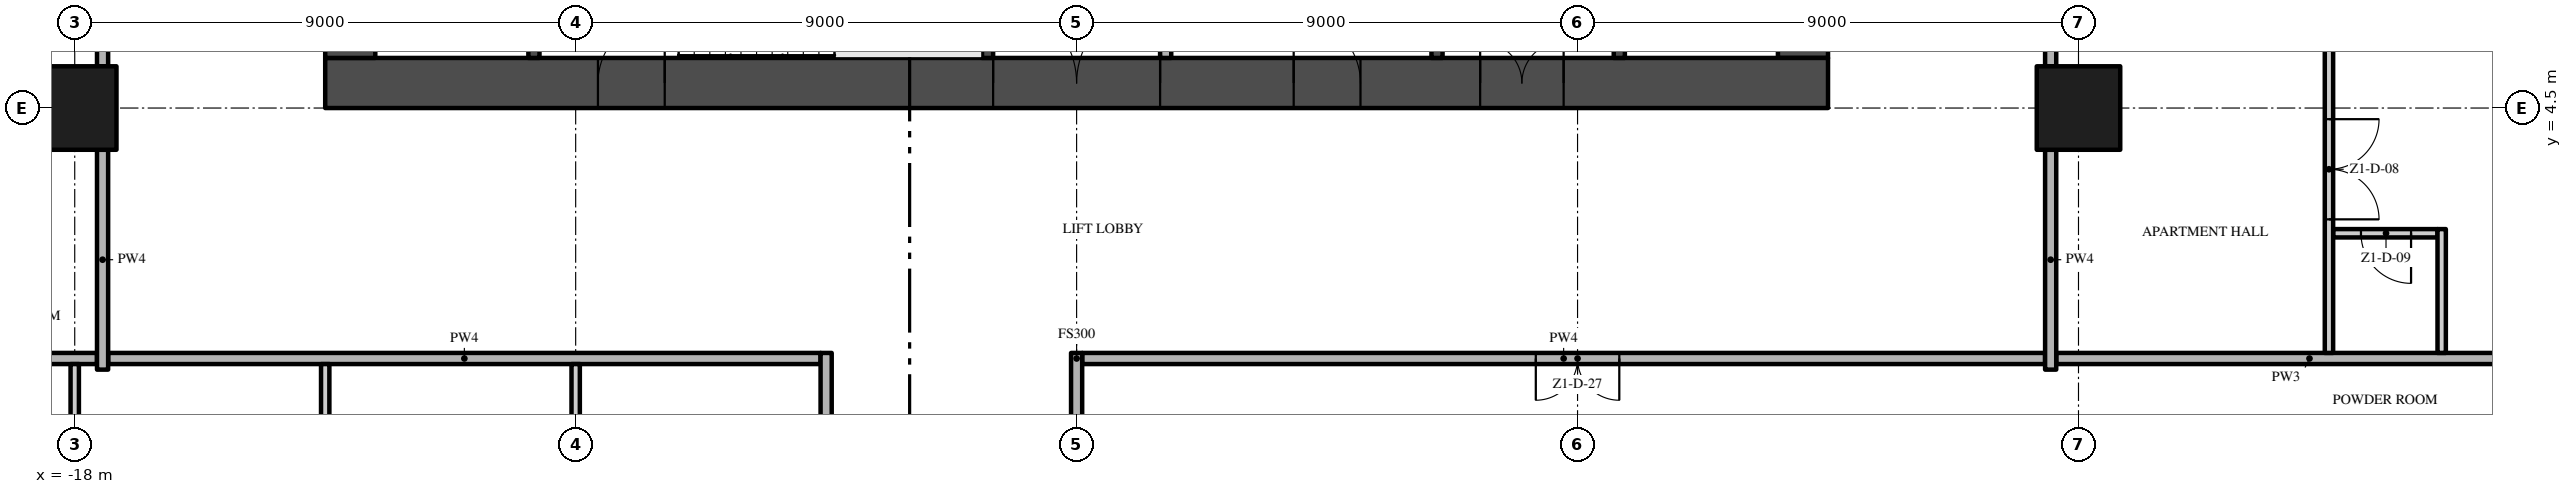
"""IFC4 building model, lengths in metres.
Left out: names, types, materials, properties, quantities, classifications, styles, units other than length and angle.
Written with IfcOpenShell. Run it as: python <this file> out.ifc"""

import sys

from ifc_helpers import new_model, si_unit, direction, frame, frame_2d, origin, origin_2d, place, context, subcontext, project, spatial, rectangle, extrude, element, fill, save


model = new_model("IFC4")
c1 = context("Model", 3, precision=1e-05, world=origin(), true_north=direction((0.0, 1.0)))
c2 = subcontext(c1, "Body", "Model", "MODEL_VIEW")
j1 = project(units=[si_unit("LENGTHUNIT", "METRE"), si_unit("PLANEANGLEUNIT", "RADIAN")], contexts=[c1])
p1 = place(None, origin())
s1 = spatial("IfcSite", under=j1, at=p1, CompositionType="ELEMENT")
p2 = place(p1, origin())
s2 = spatial("IfcBuilding", under=s1, at=p2, CompositionType="ELEMENT")
p3 = place(p2, frame((0.0, 0.0, 49.2)))
s3 = spatial("IfcBuildingStorey", under=s2, at=p3, CompositionType="ELEMENT", Elevation=49.2)
p4 = place(p3, frame((-13.5, 4.95, -0.3), z_axis=(0.0, 0.0, 1.0), x_axis=(1.0, 0.0, 0.0)))
e1 = element("IfcWall", 1, at=p4, inside=s3, PredefinedType="SHEAR", context=c2, shape_type="SweptSolid", body=[
    extrude(rectangle(XDim=27.0, YDim=0.9, at=frame_2d((13.5, 0.0))), origin(), (0.0, 0.0, 1.0), 3.8),
])
p5 = place(p4, frame((12.0, 0.0, 0.3)))
e2 = element("IfcOpeningElement", 2, at=p5, cuts=e1, PredefinedType="OPENING", context=c2, shape_type="SweptSolid", body=[
    extrude(rectangle(XDim=3.0, YDim=2.4, at=frame_2d((1.5, 1.2))), frame((0.0, 0.46, 0.0), z_axis=(0.0, -1.0, 0.0), x_axis=(1.0, 0.0, 0.0)), (0.0, 0.0, 1.0), 0.92),
])
p6 = place(p4, frame((4.9, 0.0, 0.3)))
e3 = element("IfcOpeningElement", 3, at=p6, cuts=e1, PredefinedType="OPENING", context=c2, shape_type="SweptSolid", body=[
    extrude(rectangle(XDim=1.2, YDim=2.2, at=frame_2d((0.6, 1.1))), frame((0.0, 0.46, 0.0), z_axis=(0.0, -1.0, 0.0), x_axis=(1.0, 0.0, 0.0)), (0.0, 0.0, 1.0), 0.92),
])
p7 = place(p4, frame((20.75, 0.0, 0.3)))
e4 = element("IfcOpeningElement", 4, at=p7, cuts=e1, PredefinedType="OPENING", context=c2, shape_type="SweptSolid", body=[
    extrude(rectangle(XDim=1.5, YDim=2.2, at=frame_2d((0.75, 1.1))), frame((0.0, 0.46, 0.0), z_axis=(0.0, -1.0, 0.0), x_axis=(1.0, 0.0, 0.0)), (0.0, 0.0, 1.0), 0.92),
])
p8 = place(p4, frame((17.4, 0.0, 0.3)))
e5 = element("IfcOpeningElement", 5, at=p8, cuts=e1, PredefinedType="OPENING", context=c2, shape_type="SweptSolid", body=[
    extrude(rectangle(XDim=1.2, YDim=2.2, at=frame_2d((0.6, 1.1))), frame((0.0, 0.46, 0.0), z_axis=(0.0, -1.0, 0.0), x_axis=(1.0, 0.0, 0.0)), (0.0, 0.0, 1.0), 0.92),
])
p9 = place(p3, frame((13.05, 5.4, -0.3), z_axis=(0.0, 0.0, 1.0), x_axis=(0.0, 1.0, 0.0)))
e6 = element("IfcWall", 6, at=p9, inside=s3, PredefinedType="SHEAR", context=c2, shape_type="SweptSolid", body=[
    extrude(rectangle(XDim=16.2, YDim=0.9, at=frame_2d((8.1, 0.0))), origin(), (0.0, 0.0, 1.0), 3.8),
])
p10 = place(p9, frame((6.0, 0.0, 0.3)))
e7 = element("IfcOpeningElement", 7, at=p10, cuts=e6, PredefinedType="OPENING", context=c2, shape_type="SweptSolid", body=[
    extrude(rectangle(XDim=1.2, YDim=2.2, at=frame_2d((0.6, 1.1))), frame((0.0, 0.46, 0.0), z_axis=(0.0, -1.0, 0.0), x_axis=(1.0, 0.0, 0.0)), (0.0, 0.0, 1.0), 0.92),
])
p11 = place(p3, frame((-13.05, 21.6, -0.3), z_axis=(0.0, 0.0, 1.0), x_axis=(0.0, -1.0, 0.0)))
e8 = element("IfcWall", 8, at=p11, inside=s3, PredefinedType="SHEAR", context=c2, shape_type="SweptSolid", body=[
    extrude(rectangle(XDim=16.2, YDim=0.9, at=frame_2d((8.1, 0.0))), origin(), (0.0, 0.0, 1.0), 3.8),
])
p12 = place(p11, frame((9.0, 0.0, 0.3)))
e9 = element("IfcOpeningElement", 9, at=p12, cuts=e8, PredefinedType="OPENING", context=c2, shape_type="SweptSolid", body=[
    extrude(rectangle(XDim=1.2, YDim=2.2, at=frame_2d((0.6, 1.1))), frame((0.0, 0.46, 0.0), z_axis=(0.0, -1.0, 0.0), x_axis=(1.0, 0.0, 0.0)), (0.0, 0.0, 1.0), 0.92),
])
for number, where, z_axis, x_axis in (
    (10, (-18.0, 4.5, 0.0), (0.0, 0.0, 1.0), (1.0, 0.0, 0.0)),
    (11, (18.0, 4.5, 0.0), (0.0, 0.0, 1.0), (1.0, 0.0, 0.0)),
):
    element("IfcColumn", number, at=place(p3, frame(where, z_axis=z_axis, x_axis=x_axis)), inside=s3, PredefinedType="COLUMN", context=c2, shape_type="SweptSolid", body=[
        extrude(rectangle(XDim=1.5, YDim=1.5, at=origin_2d()), origin(), (0.0, 0.0, 1.0), 3.5),
    ])
for number, where, z_axis, x_axis in (
    (12, (-9.75, 5.4, 0.0), (0.0, 0.0, 1.0), (0.0, 1.0, 0.0)),
    (13, (-1.6, 5.4, 0.0), (0.0, 0.0, 1.0), (0.0, 1.0, 0.0)),
):
    element("IfcWall", number, at=place(p3, frame(where, z_axis=z_axis, x_axis=x_axis)), inside=s3, PredefinedType="SHEAR", context=c2, shape_type="SweptSolid", body=[
        extrude(rectangle(XDim=2.55, YDim=0.2, at=frame_2d((1.275, 0.0))), origin(), (0.0, 0.0, 1.0), 3.5),
    ])
p13 = place(p3, frame((1.6, 7.5, 0.0), z_axis=(0.0, 0.0, 1.0), x_axis=(0.0, -1.0, 0.0)))
e14 = element("IfcWall", 14, at=p13, inside=s3, PredefinedType="PARTITIONING", context=c2, shape_type="SweptSolid", body=[
    extrude(rectangle(XDim=2.1, YDim=0.2, at=frame_2d((1.05, 0.0))), origin(), (0.0, 0.0, 1.0), 3.5),
])
p14 = place(p13, frame((0.25, 0.0, 0.0)))
e15 = element("IfcOpeningElement", 15, at=p14, cuts=e14, PredefinedType="OPENING", context=c2, shape_type="SweptSolid", body=[
    extrude(rectangle(XDim=0.9, YDim=2.1, at=frame_2d((0.45, 1.05))), frame((0.0, 0.11, 0.0), z_axis=(0.0, -1.0, 0.0), x_axis=(1.0, 0.0, 0.0)), (0.0, 0.0, 1.0), 0.22),
])
p15 = place(p3, frame((6.475, 5.4, 0.0), z_axis=(0.0, 0.0, 1.0), x_axis=(0.0, 1.0, 0.0)))
e16 = element("IfcWall", 16, at=p15, inside=s3, PredefinedType="SHEAR", context=c2, shape_type="SweptSolid", body=[
    extrude(rectangle(XDim=2.1, YDim=0.2, at=frame_2d((1.05, 0.0))), origin(), (0.0, 0.0, 1.0), 3.5),
])
p16 = place(p3, frame((9.75, 5.4, 0.0), z_axis=(0.0, 0.0, 1.0), x_axis=(0.0, 1.0, 0.0)))
e17 = element("IfcWall", 17, at=p16, inside=s3, PredefinedType="SHEAR", context=c2, shape_type="SweptSolid", body=[
    extrude(rectangle(XDim=2.2, YDim=0.2, at=frame_2d((1.1, 0.0))), origin(), (0.0, 0.0, 1.0), 3.5),
])
p17 = place(p16, frame((0.55, 0.0, 0.0)))
e18 = element("IfcOpeningElement", 18, at=p17, cuts=e17, PredefinedType="OPENING", context=c2, shape_type="SweptSolid", body=[
    extrude(rectangle(XDim=1.1, YDim=2.1, at=frame_2d((0.55, 1.05))), frame((0.0, 0.11, 0.0), z_axis=(0.0, -1.0, 0.0), x_axis=(1.0, 0.0, 0.0)), (0.0, 0.0, 1.0), 0.22),
])
p18 = place(p3, frame((-17.4, 0.0, 0.0), z_axis=(0.0, 0.0, 1.0), x_axis=(1.0, 0.0, 0.0)))
e19 = element("IfcWall", 19, at=p18, inside=s3, PredefinedType="PARTITIONING", context=c2, shape_type="SweptSolid", body=[
    extrude(rectangle(XDim=12.8, YDim=0.2, at=frame_2d((6.4, 0.0))), origin(), (0.0, 0.0, 1.0), 3.5),
])
p19 = place(p3, frame((17.4, 0.0, 0.0), z_axis=(0.0, 0.0, 1.0), x_axis=(-1.0, 0.0, 0.0)))
e20 = element("IfcWall", 20, at=p19, inside=s3, PredefinedType="PARTITIONING", context=c2, shape_type="SweptSolid", body=[
    extrude(rectangle(XDim=17.3, YDim=0.2, at=frame_2d((8.65, 0.0))), origin(), (0.0, 0.0, 1.0), 3.5),
])
p20 = place(p19, frame((7.65, 0.0, 0.0)))
e21 = element("IfcOpeningElement", 21, at=p20, cuts=e20, PredefinedType="OPENING", context=c2, shape_type="SweptSolid", body=[
    extrude(rectangle(XDim=1.5, YDim=2.4, at=frame_2d((0.75, 1.2))), frame((0.0, 0.11, 0.0), z_axis=(0.0, -1.0, 0.0), x_axis=(1.0, 0.0, 0.0)), (0.0, 0.0, 1.0), 0.22),
])
for number, where, z_axis, x_axis in (
    (22, (-26.7, 0.0, 0.0), (0.0, 0.0, 1.0), (1.0, 0.0, 0.0)),
    (23, (17.6, 0.0, 0.0), (0.0, 0.0, 1.0), (1.0, 0.0, 0.0)),
):
    element("IfcWall", number, at=place(p3, frame(where, z_axis=z_axis, x_axis=x_axis)), inside=s3, PredefinedType="PARTITIONING", context=c2, shape_type="SweptSolid", body=[
        extrude(rectangle(XDim=9.1, YDim=0.2, at=frame_2d((4.55, 0.0))), origin(), (0.0, 0.0, 1.0), 3.5),
    ])
p21 = place(p3, frame((24.45, 2.25, 0.0), z_axis=(0.0, 0.0, 1.0), x_axis=(-1.0, 0.0, 0.0)))
e24 = element("IfcWall", 24, at=p21, inside=s3, PredefinedType="PARTITIONING", context=c2, shape_type="SweptSolid", body=[
    extrude(rectangle(XDim=1.875, YDim=0.15, at=frame_2d((0.938, 0.0))), origin(), (0.0, 0.0, 1.0), 3.5),
])
p22 = place(p21, frame((0.475, 0.0, 0.0)))
e25 = element("IfcOpeningElement", 25, at=p22, cuts=e24, PredefinedType="OPENING", context=c2, shape_type="SweptSolid", body=[
    extrude(rectangle(XDim=0.9, YDim=2.1, at=frame_2d((0.45, 1.05))), frame((0.0, 0.085, 0.0), z_axis=(0.0, -1.0, 0.0), x_axis=(1.0, 0.0, 0.0)), (0.0, 0.0, 1.0), 0.17),
])
p23 = place(p3, frame((-18.0, -3.75, 0.0), z_axis=(0.0, 0.0, 1.0), x_axis=(0.0, 1.0, 0.0)))
e26 = element("IfcWall", 26, at=p23, inside=s3, PredefinedType="PARTITIONING", context=c2, shape_type="SweptSolid", body=[
    extrude(rectangle(XDim=3.65, YDim=0.15, at=frame_2d((1.825, 0.0))), origin(), (0.0, 0.0, 1.0), 3.5),
])
p24 = place(p23, frame((0.15, 0.0, 0.0)))
e27 = element("IfcOpeningElement", 27, at=p24, cuts=e26, PredefinedType="OPENING", context=c2, shape_type="SweptSolid", body=[
    extrude(rectangle(XDim=1.0, YDim=2.4, at=frame_2d((0.5, 1.2))), frame((0.0, 0.085, 0.0), z_axis=(0.0, -1.0, 0.0), x_axis=(1.0, 0.0, 0.0)), (0.0, 0.0, 1.0), 0.17),
])
p25 = place(p3, frame((-17.5, -0.2, 0.0), z_axis=(0.0, 0.0, 1.0), x_axis=(0.0, 1.0, 0.0)))
e28 = element("IfcWall", 28, at=p25, inside=s3, PredefinedType="PARTITIONING", context=c2, shape_type="SweptSolid", body=[
    extrude(rectangle(XDim=3.95, YDim=0.2, at=frame_2d((1.975, 0.0))), origin(), (0.0, 0.0, 1.0), 3.5),
])
p26 = place(p3, frame((-17.5, 5.25, 0.0), z_axis=(0.0, 0.0, 1.0), x_axis=(0.0, 1.0, 0.0)))
e29 = element("IfcWall", 29, at=p26, inside=s3, PredefinedType="PARTITIONING", context=c2, shape_type="SweptSolid", body=[
    extrude(rectangle(XDim=7.5, YDim=0.2, at=frame_2d((3.75, 0.0))), origin(), (0.0, 0.0, 1.0), 3.5),
])
p27 = place(p3, frame((-13.5, -8.325, 0.0), z_axis=(0.0, 0.0, 1.0), x_axis=(0.0, 1.0, 0.0)))
e30 = element("IfcWall", 30, at=p27, inside=s3, PredefinedType="PARTITIONING", context=c2, shape_type="SweptSolid", body=[
    extrude(rectangle(XDim=8.225, YDim=0.15, at=frame_2d((4.112, 0.0))), origin(), (0.0, 0.0, 1.0), 3.5),
])
p28 = place(p3, frame((-9.0, -3.75, 0.0), z_axis=(0.0, 0.0, 1.0), x_axis=(0.0, 1.0, 0.0)))
e31 = element("IfcWall", 31, at=p28, inside=s3, PredefinedType="PARTITIONING", context=c2, shape_type="SweptSolid", body=[
    extrude(rectangle(XDim=3.65, YDim=0.15, at=frame_2d((1.825, 0.0))), origin(), (0.0, 0.0, 1.0), 3.5),
])
p29 = place(p28, frame((0.25, 0.0, 0.0)))
e32 = element("IfcOpeningElement", 32, at=p29, cuts=e31, PredefinedType="OPENING", context=c2, shape_type="SweptSolid", body=[
    extrude(rectangle(XDim=1.0, YDim=2.4, at=frame_2d((0.5, 1.2))), frame((0.0, 0.085, 0.0), z_axis=(0.0, -1.0, 0.0), x_axis=(1.0, 0.0, 0.0)), (0.0, 0.0, 1.0), 0.17),
])
p30 = place(p3, frame((-4.5, -22.2, 0.0), z_axis=(0.0, 0.0, 1.0), x_axis=(0.0, 1.0, 0.0)))
e33 = element("IfcWall", 33, at=p30, inside=s3, PredefinedType="PARTITIONING", context=c2, shape_type="SweptSolid", body=[
    extrude(rectangle(XDim=22.3, YDim=0.2, at=frame_2d((11.15, 0.0))), origin(), (0.0, 0.0, 1.0), 3.5),
])
p31 = place(p30, frame((10.2, 0.0, 0.0)))
e34 = element("IfcOpeningElement", 34, at=p31, cuts=e33, PredefinedType="OPENING", context=c2, shape_type="SweptSolid", body=[
    extrude(rectangle(XDim=1.5, YDim=2.4, at=frame_2d((0.75, 1.2))), frame((0.0, 0.11, 0.0), z_axis=(0.0, -1.0, 0.0), x_axis=(1.0, 0.0, 0.0)), (0.0, 0.0, 1.0), 0.22),
])
p32 = place(p3, frame((0.0, -3.75, 0.0), z_axis=(0.0, 0.0, 1.0), x_axis=(0.0, 1.0, 0.0)))
e35 = element("IfcWall", 35, at=p32, inside=s3, PredefinedType="PARTITIONING", context=c2, shape_type="SweptSolid", body=[
    extrude(rectangle(XDim=3.85, YDim=0.2, at=frame_2d((1.925, 0.0))), origin(), (0.0, 0.0, 1.0), 3.5),
])
p33 = place(p3, frame((17.5, -0.2, 0.0), z_axis=(0.0, 0.0, 1.0), x_axis=(0.0, 1.0, 0.0)))
e36 = element("IfcWall", 36, at=p33, inside=s3, PredefinedType="PARTITIONING", context=c2, shape_type="SweptSolid", body=[
    extrude(rectangle(XDim=3.95, YDim=0.2, at=frame_2d((1.975, 0.0))), origin(), (0.0, 0.0, 1.0), 3.5),
])
p34 = place(p3, frame((17.5, 12.75, 0.0), z_axis=(0.0, 0.0, 1.0), x_axis=(0.0, -1.0, 0.0)))
e37 = element("IfcWall", 37, at=p34, inside=s3, PredefinedType="PARTITIONING", context=c2, shape_type="SweptSolid", body=[
    extrude(rectangle(XDim=7.5, YDim=0.2, at=frame_2d((3.75, 0.0))), origin(), (0.0, 0.0, 1.0), 3.5),
])
p35 = place(p34, frame((5.4, 0.0, 0.0)))
e38 = element("IfcOpeningElement", 38, at=p35, cuts=e37, PredefinedType="OPENING", context=c2, shape_type="SweptSolid", body=[
    extrude(rectangle(XDim=1.2, YDim=2.4, at=frame_2d((0.6, 1.2))), frame((0.0, 0.11, 0.0), z_axis=(0.0, -1.0, 0.0), x_axis=(1.0, 0.0, 0.0)), (0.0, 0.0, 1.0), 0.22),
])
p36 = place(p3, frame((22.5, 17.3, 0.0), z_axis=(0.0, 0.0, 1.0), x_axis=(0.0, -1.0, 0.0)))
e39 = element("IfcWall", 39, at=p36, inside=s3, PredefinedType="PARTITIONING", context=c2, shape_type="SweptSolid", body=[
    extrude(rectangle(XDim=17.2, YDim=0.15, at=frame_2d((8.6, 0.0))), origin(), (0.0, 0.0, 1.0), 3.5),
])
p37 = place(p36, frame((13.0, 0.0, 0.0)))
e40 = element("IfcOpeningElement", 40, at=p37, cuts=e39, PredefinedType="OPENING", context=c2, shape_type="SweptSolid", body=[
    extrude(rectangle(XDim=1.8, YDim=2.4, at=frame_2d((0.9, 1.2))), frame((0.0, 0.085, 0.0), z_axis=(0.0, -1.0, 0.0), x_axis=(1.0, 0.0, 0.0)), (0.0, 0.0, 1.0), 0.17),
])
p38 = place(p36, frame((5.55, 0.0, 0.0)))
e41 = element("IfcOpeningElement", 41, at=p38, cuts=e39, PredefinedType="OPENING", context=c2, shape_type="SweptSolid", body=[
    extrude(rectangle(XDim=1.0, YDim=2.4, at=frame_2d((0.5, 1.2))), frame((0.0, 0.085, 0.0), z_axis=(0.0, -1.0, 0.0), x_axis=(1.0, 0.0, 0.0)), (0.0, 0.0, 1.0), 0.17),
])
p39 = place(p36, frame((0.15, 0.0, 0.0)))
e42 = element("IfcOpeningElement", 42, at=p39, cuts=e39, PredefinedType="OPENING", context=c2, shape_type="SweptSolid", body=[
    extrude(rectangle(XDim=1.0, YDim=2.4, at=frame_2d((0.5, 1.2))), frame((0.0, 0.085, 0.0), z_axis=(0.0, -1.0, 0.0), x_axis=(1.0, 0.0, 0.0)), (0.0, 0.0, 1.0), 0.17),
])
p40 = place(p3, frame((24.525, 0.1, 0.0), z_axis=(0.0, 0.0, 1.0), x_axis=(0.0, 1.0, 0.0)))
e43 = element("IfcWall", 43, at=p40, inside=s3, PredefinedType="PARTITIONING", context=c2, shape_type="SweptSolid", body=[
    extrude(rectangle(XDim=2.225, YDim=0.15, at=frame_2d((1.113, 0.0))), origin(), (0.0, 0.0, 1.0), 3.5),
])
p41 = place(p5, frame((3.0, 0.0, 0.0), z_axis=(0.0, 0.0, 1.0), x_axis=(-1.0, 0.0, 0.0)))
e44 = element("IfcDoor", 44, at=p41, inside=s3, OperationType="DOUBLE_DOOR_SINGLE_SWING", PredefinedType="DOOR", context=c2, shape_type="SweptSolid", body=[
    extrude(rectangle(XDim=3.0, YDim=2.4, at=frame_2d((1.5, 1.2))), frame((0.0, 0.025, 0.0), z_axis=(0.0, -1.0, 0.0), x_axis=(1.0, 0.0, 0.0)), (0.0, 0.0, 1.0), 0.05),
])
fill(e2, e44)
p42 = place(p6, frame((1.2, 0.0, 0.0), z_axis=(0.0, 0.0, 1.0), x_axis=(-1.0, 0.0, 0.0)))
e45 = element("IfcDoor", 45, at=p42, inside=s3, OperationType="SINGLE_SWING_LEFT", PredefinedType="DOOR", context=c2, shape_type="SweptSolid", body=[
    extrude(rectangle(XDim=1.2, YDim=2.2, at=frame_2d((0.6, 1.1))), frame((0.0, 0.025, 0.0), z_axis=(0.0, -1.0, 0.0), x_axis=(1.0, 0.0, 0.0)), (0.0, 0.0, 1.0), 0.05),
])
fill(e3, e45)
p43 = place(p7, frame((1.5, 0.0, 0.0), z_axis=(0.0, 0.0, 1.0), x_axis=(-1.0, 0.0, 0.0)))
e46 = element("IfcDoor", 46, at=p43, inside=s3, OperationType="DOUBLE_DOOR_SINGLE_SWING", PredefinedType="DOOR", context=c2, shape_type="SweptSolid", body=[
    extrude(rectangle(XDim=1.5, YDim=2.2, at=frame_2d((0.75, 1.1))), frame((0.0, 0.025, 0.0), z_axis=(0.0, -1.0, 0.0), x_axis=(1.0, 0.0, 0.0)), (0.0, 0.0, 1.0), 0.05),
])
fill(e4, e46)
p44 = place(p8, frame((1.2, 0.0, 0.0), z_axis=(0.0, 0.0, 1.0), x_axis=(-1.0, 0.0, 0.0)))
e47 = element("IfcDoor", 47, at=p44, inside=s3, OperationType="SINGLE_SWING_RIGHT", PredefinedType="DOOR", context=c2, shape_type="SweptSolid", body=[
    extrude(rectangle(XDim=1.2, YDim=2.2, at=frame_2d((0.6, 1.1))), frame((0.0, 0.025, 0.0), z_axis=(0.0, -1.0, 0.0), x_axis=(1.0, 0.0, 0.0)), (0.0, 0.0, 1.0), 0.05),
])
fill(e5, e47)
p45 = place(p37, origin())
e48 = element("IfcDoor", 48, at=p45, inside=s3, OperationType="DOUBLE_DOOR_SINGLE_SWING", PredefinedType="DOOR", context=c2, shape_type="SweptSolid", body=[
    extrude(rectangle(XDim=1.8, YDim=2.4, at=frame_2d((0.9, 1.2))), frame((0.0, 0.025, 0.0), z_axis=(0.0, -1.0, 0.0), x_axis=(1.0, 0.0, 0.0)), (0.0, 0.0, 1.0), 0.05),
])
fill(e40, e48)
p46 = place(p22, origin())
e49 = element("IfcDoor", 49, at=p46, inside=s3, OperationType="SINGLE_SWING_LEFT", PredefinedType="DOOR", context=c2, shape_type="SweptSolid", body=[
    extrude(rectangle(XDim=0.9, YDim=2.1, at=frame_2d((0.45, 1.05))), frame((0.0, 0.025, 0.0), z_axis=(0.0, -1.0, 0.0), x_axis=(1.0, 0.0, 0.0)), (0.0, 0.0, 1.0), 0.05),
])
fill(e25, e49)
p47 = place(p20, origin())
e50 = element("IfcDoor", 50, at=p47, inside=s3, OperationType="DOUBLE_DOOR_SINGLE_SWING", PredefinedType="DOOR", context=c2, shape_type="SweptSolid", body=[
    extrude(rectangle(XDim=1.5, YDim=2.4, at=frame_2d((0.75, 1.2))), frame((0.0, 0.025, 0.0), z_axis=(0.0, -1.0, 0.0), x_axis=(1.0, 0.0, 0.0)), (0.0, 0.0, 1.0), 0.05),
])
fill(e21, e50)
save(model, sys.argv[1])
